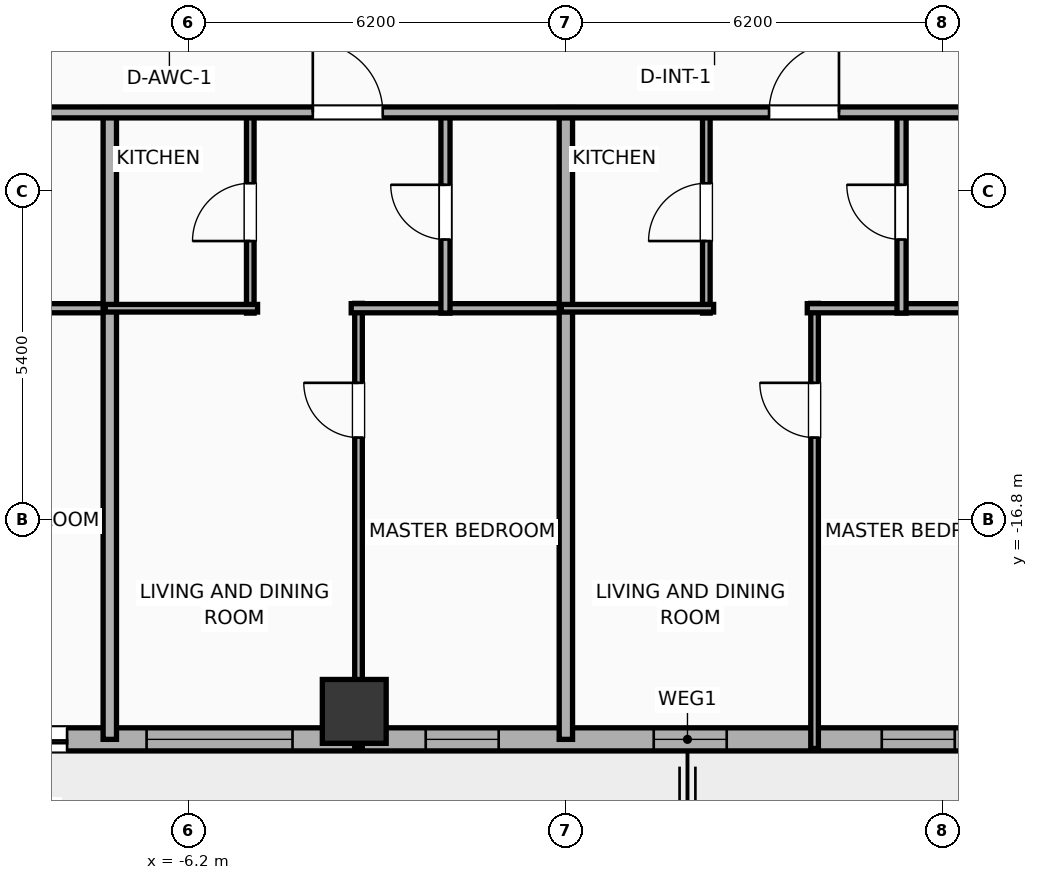
"""IFC4 building model, lengths in metres.
Left out: names, types, materials, properties, quantities, classifications, styles, units other than length and angle.
Written with IfcOpenShell. Run it as: python <this file> out.ifc"""

import sys

from ifc_helpers import new_model, si_unit, direction, frame, frame_2d, origin, origin_2d, place, context, subcontext, project, spatial, rectangle, hollow_rectangle, extrude, element, fill, save


model = new_model("IFC4")
c1 = context("Model", 3, precision=1e-05, world=origin(), true_north=direction((0.0, 1.0)))
c2 = subcontext(c1, "Body", "Model", "MODEL_VIEW")
j1 = project(units=[si_unit("LENGTHUNIT", "METRE"), si_unit("PLANEANGLEUNIT", "RADIAN")], contexts=[c1])
p1 = place(None, origin())
s1 = spatial("IfcSite", under=j1, at=p1, CompositionType="ELEMENT")
p2 = place(p1, origin())
s2 = spatial("IfcBuilding", under=s1, at=p2, CompositionType="ELEMENT")
p3 = place(p2, frame((0.0, 0.0, 113.1)))
s3 = spatial("IfcBuildingStorey", under=s2, at=p3, CompositionType="ELEMENT", Elevation=113.1)
p4 = place(p3, frame((-3.48, -19.95, 0.0), z_axis=(0.0, 0.0, 1.0), x_axis=(1.0, 0.0, 0.0)))
e1 = element("IfcColumn", 1, at=p4, inside=s3, PredefinedType="COLUMN", context=c2, shape_type="SweptSolid", body=[
    extrude(hollow_rectangle(XDim=1.05, YDim=1.05, WallThickness=0.036, at=origin_2d()), origin(), (0.0, 0.0, 1.0), 3.9),
])
p5 = place(p3, frame((29.381, -20.41, 0.0), z_axis=(0.0, 0.0, 1.0), x_axis=(-1.0, 0.0, 0.0)))
e2 = element("IfcWall", 2, at=p5, inside=s3, PredefinedType="ELEMENTEDWALL", context=c2, shape_type="SweptSolid", body=[
    extrude(rectangle(XDim=54.763, YDim=0.38, at=frame_2d((27.381, 0.0))), origin(), (0.0, 0.0, 1.0), 3.65),
])
p6 = place(p5, frame((15.679, 0.0, 0.0)))
e3 = element("IfcOpeningElement", 3, at=p6, cuts=e2, PredefinedType="OPENING", context=c2, shape_type="SweptSolid", body=[
    extrude(rectangle(XDim=1.5, YDim=2.05, at=frame_2d((0.75, 1.025))), frame((0.0, 0.2, 0.0), z_axis=(0.0, -1.0, 0.0), x_axis=(1.0, 0.0, 0.0)), (0.0, 0.0, 1.0), 0.4),
])
p7 = place(p5, frame((7.295, 0.0, 0.75)))
e4 = element("IfcOpeningElement", 4, at=p7, cuts=e2, PredefinedType="OPENING", context=c2, shape_type="SweptSolid", body=[
    extrude(rectangle(XDim=2.4, YDim=2.1, at=frame_2d((1.2, 1.05))), frame((0.0, 0.2, 0.0), z_axis=(0.0, -1.0, 0.0), x_axis=(1.0, 0.0, 0.0)), (0.0, 0.0, 1.0), 0.4),
])
p8 = place(p5, frame((18.486, 0.0, 0.75)))
e5 = element("IfcOpeningElement", 5, at=p8, cuts=e2, PredefinedType="OPENING", context=c2, shape_type="SweptSolid", body=[
    extrude(rectangle(XDim=2.4, YDim=2.1, at=frame_2d((1.2, 1.05))), frame((0.0, 0.2, 0.0), z_axis=(0.0, -1.0, 0.0), x_axis=(1.0, 0.0, 0.0)), (0.0, 0.0, 1.0), 0.4),
])
p9 = place(p5, frame((33.877, 0.0, 0.75)))
e6 = element("IfcOpeningElement", 6, at=p9, cuts=e2, PredefinedType="OPENING", context=c2, shape_type="SweptSolid", body=[
    extrude(rectangle(XDim=2.4, YDim=2.1, at=frame_2d((1.2, 1.05))), frame((0.0, 0.2, 0.0), z_axis=(0.0, -1.0, 0.0), x_axis=(1.0, 0.0, 0.0)), (0.0, 0.0, 1.0), 0.4),
])
p10 = place(p5, frame((48.367, 0.0, 0.75)))
e7 = element("IfcOpeningElement", 7, at=p10, cuts=e2, PredefinedType="OPENING", context=c2, shape_type="SweptSolid", body=[
    extrude(rectangle(XDim=2.4, YDim=2.1, at=frame_2d((1.2, 1.05))), frame((0.0, 0.2, 0.0), z_axis=(0.0, -1.0, 0.0), x_axis=(1.0, 0.0, 0.0)), (0.0, 0.0, 1.0), 0.4),
])
p11 = place(p5, frame((37.584, 0.0, 0.0)))
e8 = element("IfcOpeningElement", 8, at=p11, cuts=e2, PredefinedType="OPENING", context=c2, shape_type="SweptSolid", body=[
    extrude(rectangle(XDim=1.5, YDim=2.05, at=frame_2d((0.75, 1.025))), frame((0.0, 0.2, 0.0), z_axis=(0.0, -1.0, 0.0), x_axis=(1.0, 0.0, 0.0)), (0.0, 0.0, 1.0), 0.4),
])
p12 = place(p5, frame((52.277, 0.0, 0.75)))
e9 = element("IfcOpeningElement", 9, at=p12, cuts=e2, PredefinedType="OPENING", context=c2, shape_type="SweptSolid", body=[
    extrude(rectangle(XDim=1.2, YDim=2.05, at=frame_2d((0.6, 1.025))), frame((0.0, 0.2, 0.0), z_axis=(0.0, -1.0, 0.0), x_axis=(1.0, 0.0, 0.0)), (0.0, 0.0, 1.0), 0.4),
])
p13 = place(p5, frame((45.486, 0.0, 0.75)))
e10 = element("IfcOpeningElement", 10, at=p13, cuts=e2, PredefinedType="OPENING", context=c2, shape_type="SweptSolid", body=[
    extrude(rectangle(XDim=1.2, YDim=2.05, at=frame_2d((0.6, 1.025))), frame((0.0, 0.2, 0.0), z_axis=(0.0, -1.0, 0.0), x_axis=(1.0, 0.0, 0.0)), (0.0, 0.0, 1.0), 0.4),
])
p14 = place(p5, frame((41.736, 0.0, 0.75)))
e11 = element("IfcOpeningElement", 11, at=p14, cuts=e2, PredefinedType="OPENING", context=c2, shape_type="SweptSolid", body=[
    extrude(rectangle(XDim=1.2, YDim=2.05, at=frame_2d((0.6, 1.025))), frame((0.0, 0.2, 0.0), z_axis=(0.0, -1.0, 0.0), x_axis=(1.0, 0.0, 0.0)), (0.0, 0.0, 1.0), 0.4),
])
p15 = place(p5, frame((30.486, 0.0, 0.75)))
e12 = element("IfcOpeningElement", 12, at=p15, cuts=e2, PredefinedType="OPENING", context=c2, shape_type="SweptSolid", body=[
    extrude(rectangle(XDim=1.2, YDim=2.05, at=frame_2d((0.6, 1.025))), frame((0.0, 0.2, 0.0), z_axis=(0.0, -1.0, 0.0), x_axis=(1.0, 0.0, 0.0)), (0.0, 0.0, 1.0), 0.4),
])
p16 = place(p5, frame((26.736, 0.0, 0.75)))
e13 = element("IfcOpeningElement", 13, at=p16, cuts=e2, PredefinedType="OPENING", context=c2, shape_type="SweptSolid", body=[
    extrude(rectangle(XDim=1.2, YDim=2.05, at=frame_2d((0.6, 1.025))), frame((0.0, 0.2, 0.0), z_axis=(0.0, -1.0, 0.0), x_axis=(1.0, 0.0, 0.0)), (0.0, 0.0, 1.0), 0.4),
])
p17 = place(p5, frame((22.986, 0.0, 0.75)))
e14 = element("IfcOpeningElement", 14, at=p17, cuts=e2, PredefinedType="OPENING", context=c2, shape_type="SweptSolid", body=[
    extrude(rectangle(XDim=1.2, YDim=2.05, at=frame_2d((0.6, 1.025))), frame((0.0, 0.2, 0.0), z_axis=(0.0, -1.0, 0.0), x_axis=(1.0, 0.0, 0.0)), (0.0, 0.0, 1.0), 0.4),
])
p18 = place(p5, frame((11.736, 0.0, 0.75)))
e15 = element("IfcOpeningElement", 15, at=p18, cuts=e2, PredefinedType="OPENING", context=c2, shape_type="SweptSolid", body=[
    extrude(rectangle(XDim=1.2, YDim=2.05, at=frame_2d((0.6, 1.025))), frame((0.0, 0.2, 0.0), z_axis=(0.0, -1.0, 0.0), x_axis=(1.0, 0.0, 0.0)), (0.0, 0.0, 1.0), 0.4),
])
p19 = place(p5, frame((3.286, 0.0, 0.75)))
e16 = element("IfcOpeningElement", 16, at=p19, cuts=e2, PredefinedType="OPENING", context=c2, shape_type="SweptSolid", body=[
    extrude(rectangle(XDim=1.2, YDim=2.05, at=frame_2d((0.6, 1.025))), frame((0.0, 0.2, 0.0), z_axis=(0.0, -1.0, 0.0), x_axis=(1.0, 0.0, 0.0)), (0.0, 0.0, 1.0), 0.4),
])
p20 = place(p3, frame((-11.03, -13.32, 0.0), z_axis=(0.0, 0.0, 1.0), x_axis=(1.0, 0.0, 0.0)))
e17 = element("IfcWall", 17, at=p20, inside=s3, PredefinedType="PLUMBINGWALL", context=c2, shape_type="SweptSolid", body=[
    extrude(rectangle(XDim=3.605, YDim=0.15, at=frame_2d((1.802, 0.0))), origin(), (0.0, 0.0, 1.0), 3.65),
])
p21 = place(p3, frame((-7.5, -20.41, 0.0), z_axis=(0.0, 0.0, 1.0), x_axis=(0.0, 1.0, 0.0)))
e18 = element("IfcWall", 18, at=p21, inside=s3, PredefinedType="PARTITIONING", context=c2, shape_type="SweptSolid", body=[
    extrude(rectangle(XDim=10.39, YDim=0.22, at=frame_2d((5.195, 0.0))), origin(), (0.0, 0.0, 1.0), 3.65),
])
p22 = place(p3, frame((-3.41, -20.56, 0.0), z_axis=(0.0, 0.0, 1.0), x_axis=(0.0, 1.0, 0.0)))
e19 = element("IfcWall", 19, at=p22, inside=s3, PredefinedType="PARTITIONING", context=c2, shape_type="SweptSolid", body=[
    extrude(rectangle(XDim=7.32, YDim=0.125, at=frame_2d((3.66, 0.0))), origin(), (0.0, 0.0, 1.0), 3.04),
])
p23 = place(p22, frame((5.113, 0.0, 0.0)))
e20 = element("IfcOpeningElement", 20, at=p23, cuts=e19, PredefinedType="OPENING", context=c2, shape_type="SweptSolid", body=[
    extrude(rectangle(XDim=0.9, YDim=2.05, at=frame_2d((0.45, 1.025))), frame((0.0, 0.073, 0.0), z_axis=(0.0, -1.0, 0.0), x_axis=(1.0, 0.0, 0.0)), (0.0, 0.0, 1.0), 0.145),
])
p24 = place(p3, frame((-3.53, -13.32, 0.0), z_axis=(0.0, 0.0, 1.0), x_axis=(1.0, 0.0, 0.0)))
e21 = element("IfcWall", 21, at=p24, inside=s3, PredefinedType="PLUMBINGWALL", context=c2, shape_type="SweptSolid", body=[
    extrude(rectangle(XDim=3.605, YDim=0.15, at=frame_2d((1.802, 0.0))), origin(), (0.0, 0.0, 1.0), 3.65),
])
p25 = place(p3, frame((-5.19, -13.4, 0.0), z_axis=(0.0, 0.0, 1.0), x_axis=(0.0, 1.0, 0.0)))
e22 = element("IfcWall", 22, at=p25, inside=s3, PredefinedType="PARTITIONING", context=c2, shape_type="SweptSolid", body=[
    extrude(rectangle(XDim=3.32, YDim=0.125, at=frame_2d((1.66, 0.0))), origin(), (0.0, 0.0, 1.0), 3.65),
])
p26 = place(p25, frame((1.185, 0.0, 0.0)))
e23 = element("IfcOpeningElement", 23, at=p26, cuts=e22, PredefinedType="OPENING", context=c2, shape_type="SweptSolid", body=[
    extrude(rectangle(XDim=0.95, YDim=2.05, at=frame_2d((0.475, 1.025))), frame((0.0, 0.073, 0.0), z_axis=(0.0, -1.0, 0.0), x_axis=(1.0, 0.0, 0.0)), (0.0, 0.0, 1.0), 0.145),
])
p27 = place(p3, frame((-7.575, -13.32, 0.0), z_axis=(0.0, 0.0, 1.0), x_axis=(1.0, 0.0, 0.0)))
e24 = element("IfcWall", 24, at=p27, inside=s3, PredefinedType="PARTITIONING", context=c2, shape_type="SweptSolid", body=[
    extrude(rectangle(XDim=2.505, YDim=0.125, at=frame_2d((1.252, 0.0))), origin(), (0.0, 0.0, 1.0), 3.65),
])
p28 = place(p3, frame((-1.98, -13.4, 0.0), z_axis=(0.0, 0.0, 1.0), x_axis=(0.0, 1.0, 0.0)))
e25 = element("IfcWall", 25, at=p28, inside=s3, PredefinedType="PLUMBINGWALL", context=c2, shape_type="SweptSolid", body=[
    extrude(rectangle(XDim=3.32, YDim=0.15, at=frame_2d((1.66, 0.0))), origin(), (0.0, 0.0, 1.0), 3.65),
])
p29 = place(p28, frame((1.21, 0.0, 0.0)))
e26 = element("IfcOpeningElement", 26, at=p29, cuts=e25, PredefinedType="OPENING", context=c2, shape_type="SweptSolid", body=[
    extrude(rectangle(XDim=0.9, YDim=2.05, at=frame_2d((0.45, 1.025))), frame((0.0, 0.085, 0.0), z_axis=(0.0, -1.0, 0.0), x_axis=(1.0, 0.0, 0.0)), (0.0, 0.0, 1.0), 0.17),
])
p30 = place(p3, frame((0.0, -20.41, 0.0), z_axis=(0.0, 0.0, 1.0), x_axis=(0.0, 1.0, 0.0)))
e27 = element("IfcWall", 27, at=p30, inside=s3, PredefinedType="PARTITIONING", context=c2, shape_type="SweptSolid", body=[
    extrude(rectangle(XDim=10.39, YDim=0.22, at=frame_2d((5.195, 0.0))), origin(), (0.0, 0.0, 1.0), 3.65),
])
p31 = place(p3, frame((4.09, -20.56, 0.0), z_axis=(0.0, 0.0, 1.0), x_axis=(0.0, 1.0, 0.0)))
e28 = element("IfcWall", 28, at=p31, inside=s3, PredefinedType="PARTITIONING", context=c2, shape_type="SweptSolid", body=[
    extrude(rectangle(XDim=7.32, YDim=0.125, at=frame_2d((3.66, 0.0))), origin(), (0.0, 0.0, 1.0), 3.65),
])
p32 = place(p31, frame((5.113, 0.0, 0.0)))
e29 = element("IfcOpeningElement", 29, at=p32, cuts=e28, PredefinedType="OPENING", context=c2, shape_type="SweptSolid", body=[
    extrude(rectangle(XDim=0.9, YDim=2.05, at=frame_2d((0.45, 1.025))), frame((0.0, 0.073, 0.0), z_axis=(0.0, -1.0, 0.0), x_axis=(1.0, 0.0, 0.0)), (0.0, 0.0, 1.0), 0.145),
])
p33 = place(p3, frame((3.97, -13.32, 0.0), z_axis=(0.0, 0.0, 1.0), x_axis=(1.0, 0.0, 0.0)))
e30 = element("IfcWall", 30, at=p33, inside=s3, PredefinedType="PLUMBINGWALL", context=c2, shape_type="SweptSolid", body=[
    extrude(rectangle(XDim=3.79, YDim=0.15, at=frame_2d((1.895, 0.0))), origin(), (0.0, 0.0, 1.0), 3.65),
])
p34 = place(p3, frame((2.31, -13.4, 0.0), z_axis=(0.0, 0.0, 1.0), x_axis=(0.0, 1.0, 0.0)))
e31 = element("IfcWall", 31, at=p34, inside=s3, PredefinedType="PARTITIONING", context=c2, shape_type="SweptSolid", body=[
    extrude(rectangle(XDim=3.32, YDim=0.125, at=frame_2d((1.66, 0.0))), origin(), (0.0, 0.0, 1.0), 3.65),
])
p35 = place(p34, frame((1.185, 0.0, 0.0)))
e32 = element("IfcOpeningElement", 32, at=p35, cuts=e31, PredefinedType="OPENING", context=c2, shape_type="SweptSolid", body=[
    extrude(rectangle(XDim=0.95, YDim=2.05, at=frame_2d((0.475, 1.025))), frame((0.0, 0.073, 0.0), z_axis=(0.0, -1.0, 0.0), x_axis=(1.0, 0.0, 0.0)), (0.0, 0.0, 1.0), 0.145),
])
p36 = place(p3, frame((-0.075, -13.32, 0.0), z_axis=(0.0, 0.0, 1.0), x_axis=(1.0, 0.0, 0.0)))
e33 = element("IfcWall", 33, at=p36, inside=s3, PredefinedType="PARTITIONING", context=c2, shape_type="SweptSolid", body=[
    extrude(rectangle(XDim=2.505, YDim=0.125, at=frame_2d((1.252, 0.0))), origin(), (0.0, 0.0, 1.0), 3.65),
])
p37 = place(p3, frame((5.52, -13.4, 0.0), z_axis=(0.0, 0.0, 1.0), x_axis=(0.0, 1.0, 0.0)))
e34 = element("IfcWall", 34, at=p37, inside=s3, PredefinedType="PLUMBINGWALL", context=c2, shape_type="SweptSolid", body=[
    extrude(rectangle(XDim=3.32, YDim=0.15, at=frame_2d((1.66, 0.0))), origin(), (0.0, 0.0, 1.0), 3.04),
])
p38 = place(p37, frame((1.21, 0.0, 0.0)))
e35 = element("IfcOpeningElement", 35, at=p38, cuts=e34, PredefinedType="OPENING", context=c2, shape_type="SweptSolid", body=[
    extrude(rectangle(XDim=0.9, YDim=2.05, at=frame_2d((0.45, 1.025))), frame((0.0, 0.085, 0.0), z_axis=(0.0, -1.0, 0.0), x_axis=(1.0, 0.0, 0.0)), (0.0, 0.0, 1.0), 0.17),
])
p39 = place(p3, frame((-29.21, -10.1, 0.0), z_axis=(0.0, 0.0, 1.0), x_axis=(1.0, 0.0, 0.0)))
e36 = element("IfcWall", 36, at=p39, inside=s3, PredefinedType="PARTITIONING", context=c2, shape_type="SweptSolid", body=[
    extrude(rectangle(XDim=62.42, YDim=0.18, at=frame_2d((31.21, 0.0))), origin(), (0.0, 0.0, 1.0), 3.65),
])
p40 = place(p39, frame((3.002, 0.0, 0.0)))
e37 = element("IfcOpeningElement", 37, at=p40, cuts=e36, PredefinedType="OPENING", context=c2, shape_type="SweptSolid", body=[
    extrude(rectangle(XDim=0.9, YDim=2.05, at=frame_2d((0.45, 1.025))), frame((0.0, 0.1, 0.0), z_axis=(0.0, -1.0, 0.0), x_axis=(1.0, 0.0, 0.0)), (0.0, 0.0, 1.0), 0.2),
])
p41 = place(p39, frame((10.049, 0.0, 0.0)))
e38 = element("IfcOpeningElement", 38, at=p41, cuts=e36, PredefinedType="OPENING", context=c2, shape_type="SweptSolid", body=[
    extrude(rectangle(XDim=1.15, YDim=2.05, at=frame_2d((0.575, 1.025))), frame((0.0, 0.1, 0.0), z_axis=(0.0, -1.0, 0.0), x_axis=(1.0, 0.0, 0.0)), (0.0, 0.0, 1.0), 0.2),
])
p42 = place(p39, frame((17.552, 0.0, 0.0)))
e39 = element("IfcOpeningElement", 39, at=p42, cuts=e36, PredefinedType="OPENING", context=c2, shape_type="SweptSolid", body=[
    extrude(rectangle(XDim=1.15, YDim=2.05, at=frame_2d((0.575, 1.025))), frame((0.0, 0.1, 0.0), z_axis=(0.0, -1.0, 0.0), x_axis=(1.0, 0.0, 0.0)), (0.0, 0.0, 1.0), 0.2),
])
p43 = place(p39, frame((25.048, 0.0, 0.0)))
e40 = element("IfcOpeningElement", 40, at=p43, cuts=e36, PredefinedType="OPENING", context=c2, shape_type="SweptSolid", body=[
    extrude(rectangle(XDim=1.15, YDim=2.05, at=frame_2d((0.575, 1.025))), frame((0.0, 0.1, 0.0), z_axis=(0.0, -1.0, 0.0), x_axis=(1.0, 0.0, 0.0)), (0.0, 0.0, 1.0), 0.2),
])
p44 = place(p39, frame((32.551, 0.0, 0.0)))
e41 = element("IfcOpeningElement", 41, at=p44, cuts=e36, PredefinedType="OPENING", context=c2, shape_type="SweptSolid", body=[
    extrude(rectangle(XDim=1.15, YDim=2.05, at=frame_2d((0.575, 1.025))), frame((0.0, 0.1, 0.0), z_axis=(0.0, -1.0, 0.0), x_axis=(1.0, 0.0, 0.0)), (0.0, 0.0, 1.0), 0.2),
])
p45 = place(p39, frame((40.048, 0.0, 0.0)))
e42 = element("IfcOpeningElement", 42, at=p45, cuts=e36, PredefinedType="OPENING", context=c2, shape_type="SweptSolid", body=[
    extrude(rectangle(XDim=1.15, YDim=2.05, at=frame_2d((0.575, 1.025))), frame((0.0, 0.1, 0.0), z_axis=(0.0, -1.0, 0.0), x_axis=(1.0, 0.0, 0.0)), (0.0, 0.0, 1.0), 0.2),
])
p46 = place(p39, frame((47.551, 0.0, 0.0)))
e43 = element("IfcOpeningElement", 43, at=p46, cuts=e36, PredefinedType="OPENING", context=c2, shape_type="SweptSolid", body=[
    extrude(rectangle(XDim=1.15, YDim=2.05, at=frame_2d((0.575, 1.025))), frame((0.0, 0.1, 0.0), z_axis=(0.0, -1.0, 0.0), x_axis=(1.0, 0.0, 0.0)), (0.0, 0.0, 1.0), 0.2),
])
p47 = place(p39, frame((57.064, 0.0, 0.0)))
e44 = element("IfcOpeningElement", 44, at=p47, cuts=e36, PredefinedType="OPENING", context=c2, shape_type="SweptSolid", body=[
    extrude(rectangle(XDim=1.15, YDim=2.05, at=frame_2d((0.575, 1.025))), frame((0.0, 0.1, 0.0), z_axis=(0.0, -1.0, 0.0), x_axis=(1.0, 0.0, 0.0)), (0.0, 0.0, 1.0), 0.2),
])
p48 = place(p9, origin())
e45 = element("IfcWindow", 45, at=p48, inside=s3, PartitioningType="SINGLE_PANEL", PredefinedType="WINDOW", context=c2, shape_type="SweptSolid", body=[
    extrude(rectangle(XDim=2.4, YDim=2.1, at=frame_2d((1.2, 1.05))), frame((0.0, 0.03, 0.0), z_axis=(0.0, -1.0, 0.0), x_axis=(1.0, 0.0, 0.0)), (0.0, 0.0, 1.0), 0.06),
])
fill(e6, e45)
p49 = place(p11, origin())
e46 = element("IfcDoor", 46, at=p49, inside=s3, OperationType="SLIDING_TO_RIGHT", PredefinedType="DOOR", context=c2, shape_type="SweptSolid", body=[
    extrude(rectangle(XDim=1.5, YDim=2.05, at=frame_2d((0.75, 1.025))), frame((0.0, 0.025, 0.0), z_axis=(0.0, -1.0, 0.0), x_axis=(1.0, 0.0, 0.0)), (0.0, 0.0, 1.0), 0.05),
])
fill(e8, e46)
p50 = place(p15, origin())
e47 = element("IfcWindow", 47, at=p50, inside=s3, PartitioningType="SINGLE_PANEL", PredefinedType="WINDOW", context=c2, shape_type="SweptSolid", body=[
    extrude(rectangle(XDim=1.2, YDim=2.05, at=frame_2d((0.6, 1.025))), frame((0.0, 0.03, 0.0), z_axis=(0.0, -1.0, 0.0), x_axis=(1.0, 0.0, 0.0)), (0.0, 0.0, 1.0), 0.06),
])
fill(e12, e47)
p51 = place(p16, origin())
e48 = element("IfcWindow", 48, at=p51, inside=s3, PartitioningType="SINGLE_PANEL", PredefinedType="WINDOW", context=c2, shape_type="SweptSolid", body=[
    extrude(rectangle(XDim=1.2, YDim=2.05, at=frame_2d((0.6, 1.025))), frame((0.0, 0.03, 0.0), z_axis=(0.0, -1.0, 0.0), x_axis=(1.0, 0.0, 0.0)), (0.0, 0.0, 1.0), 0.06),
])
fill(e13, e48)
p52 = place(p17, origin())
e49 = element("IfcWindow", 49, at=p52, inside=s3, PartitioningType="SINGLE_PANEL", PredefinedType="WINDOW", context=c2, shape_type="SweptSolid", body=[
    extrude(rectangle(XDim=1.2, YDim=2.05, at=frame_2d((0.6, 1.025))), frame((0.0, 0.03, 0.0), z_axis=(0.0, -1.0, 0.0), x_axis=(1.0, 0.0, 0.0)), (0.0, 0.0, 1.0), 0.06),
])
fill(e14, e49)
p53 = place(p23, origin())
e50 = element("IfcDoor", 50, at=p53, inside=s3, OperationType="SINGLE_SWING_RIGHT", PredefinedType="DOOR", context=c2, shape_type="SweptSolid", body=[
    extrude(rectangle(XDim=0.9, YDim=2.05, at=frame_2d((0.45, 1.025))), frame((0.0, 0.025, 0.0), z_axis=(0.0, -1.0, 0.0), x_axis=(1.0, 0.0, 0.0)), (0.0, 0.0, 1.0), 0.05),
])
fill(e20, e50)
p54 = place(p26, origin())
e51 = element("IfcDoor", 51, at=p54, inside=s3, OperationType="SINGLE_SWING_LEFT", PredefinedType="DOOR", context=c2, shape_type="SweptSolid", body=[
    extrude(rectangle(XDim=0.95, YDim=2.05, at=frame_2d((0.475, 1.025))), frame((0.0, 0.025, 0.0), z_axis=(0.0, -1.0, 0.0), x_axis=(1.0, 0.0, 0.0)), (0.0, 0.0, 1.0), 0.05),
])
fill(e23, e51)
p55 = place(p29, origin())
e52 = element("IfcDoor", 52, at=p55, inside=s3, OperationType="SINGLE_SWING_RIGHT", PredefinedType="DOOR", context=c2, shape_type="SweptSolid", body=[
    extrude(rectangle(XDim=0.9, YDim=2.05, at=frame_2d((0.45, 1.025))), frame((0.0, 0.025, 0.0), z_axis=(0.0, -1.0, 0.0), x_axis=(1.0, 0.0, 0.0)), (0.0, 0.0, 1.0), 0.05),
])
fill(e26, e52)
p56 = place(p32, origin())
e53 = element("IfcDoor", 53, at=p56, inside=s3, OperationType="SINGLE_SWING_RIGHT", PredefinedType="DOOR", context=c2, shape_type="SweptSolid", body=[
    extrude(rectangle(XDim=0.9, YDim=2.05, at=frame_2d((0.45, 1.025))), frame((0.0, 0.025, 0.0), z_axis=(0.0, -1.0, 0.0), x_axis=(1.0, 0.0, 0.0)), (0.0, 0.0, 1.0), 0.05),
])
fill(e29, e53)
p57 = place(p35, origin())
e54 = element("IfcDoor", 54, at=p57, inside=s3, OperationType="SINGLE_SWING_LEFT", PredefinedType="DOOR", context=c2, shape_type="SweptSolid", body=[
    extrude(rectangle(XDim=0.95, YDim=2.05, at=frame_2d((0.475, 1.025))), frame((0.0, 0.025, 0.0), z_axis=(0.0, -1.0, 0.0), x_axis=(1.0, 0.0, 0.0)), (0.0, 0.0, 1.0), 0.05),
])
fill(e32, e54)
p58 = place(p38, origin())
e55 = element("IfcDoor", 55, at=p58, inside=s3, OperationType="SINGLE_SWING_RIGHT", PredefinedType="DOOR", context=c2, shape_type="SweptSolid", body=[
    extrude(rectangle(XDim=0.9, YDim=2.05, at=frame_2d((0.45, 1.025))), frame((0.0, 0.025, 0.0), z_axis=(0.0, -1.0, 0.0), x_axis=(1.0, 0.0, 0.0)), (0.0, 0.0, 1.0), 0.05),
])
fill(e35, e55)
p59 = place(p43, origin())
e56 = element("IfcDoor", 56, at=p59, inside=s3, OperationType="SINGLE_SWING_LEFT", PredefinedType="DOOR", context=c2, shape_type="SweptSolid", body=[
    extrude(rectangle(XDim=1.15, YDim=2.05, at=frame_2d((0.575, 1.025))), frame((0.0, 0.025, 0.0), z_axis=(0.0, -1.0, 0.0), x_axis=(1.0, 0.0, 0.0)), (0.0, 0.0, 1.0), 0.05),
])
fill(e40, e56)
p60 = place(p44, origin())
e57 = element("IfcDoor", 57, at=p60, inside=s3, OperationType="SINGLE_SWING_RIGHT", PredefinedType="DOOR", context=c2, shape_type="SweptSolid", body=[
    extrude(rectangle(XDim=1.15, YDim=2.05, at=frame_2d((0.575, 1.025))), frame((0.0, 0.025, 0.0), z_axis=(0.0, -1.0, 0.0), x_axis=(1.0, 0.0, 0.0)), (0.0, 0.0, 1.0), 0.05),
])
fill(e41, e57)
save(model, sys.argv[1])
